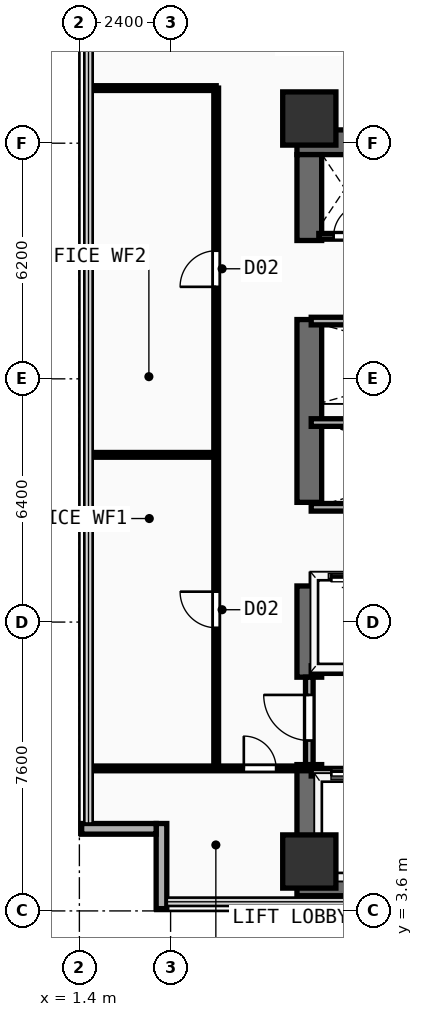
"""IFC4 building model, lengths in metres.
Left out: names, types, materials, properties, quantities, classifications, styles, units other than length and angle.
Written with IfcOpenShell. Run it as: python <this file> out.ifc"""

import sys

from ifc_helpers import new_model, si_unit, direction, frame, frame_2d, origin, origin_2d, place, context, subcontext, project, spatial, rectangle, extrude, element, fill, save


model = new_model("IFC4")
c1 = context("Model", 3, precision=1e-05, world=origin(), true_north=direction((0.0, 1.0)))
c2 = subcontext(c1, "Body", "Model", "MODEL_VIEW")
j1 = project(units=[si_unit("LENGTHUNIT", "METRE"), si_unit("PLANEANGLEUNIT", "RADIAN")], contexts=[c1])
p1 = place(None, origin())
s1 = spatial("IfcSite", under=j1, at=p1, CompositionType="ELEMENT")
p2 = place(p1, origin())
s2 = spatial("IfcBuilding", under=s1, at=p2, CompositionType="ELEMENT")
p3 = place(p2, frame((0.0, 0.0, 95.5)))
s3 = spatial("IfcBuildingStorey", under=s2, at=p3, CompositionType="ELEMENT", Elevation=95.5)
for number, where, z_axis, x_axis in (
    (1, (7.125, 4.325, 0.0), (0.0, 0.0, 1.0), (1.0, 0.0, 0.0)),
    (2, (7.125, 23.825, 0.0), (0.0, 0.0, 1.0), (1.0, 0.0, 0.0)),
):
    element("IfcWall", number, at=place(p3, frame(where, z_axis=z_axis, x_axis=x_axis)), inside=s3, PredefinedType="SHEAR", context=c2, shape_type="SweptSolid", body=[
        extrude(rectangle(XDim=14.0, YDim=0.65, at=frame_2d((7.0, 0.0))), origin(), (0.0, 0.0, 1.0), 3.54),
    ])
p4 = place(p3, frame((7.45, 4.65, 0.0), z_axis=(0.0, 0.0, 1.0), x_axis=(0.0, 1.0, 0.0)))
e3 = element("IfcWall", 3, at=p4, inside=s3, PredefinedType="SHEAR", context=c2, shape_type="SweptSolid", body=[
    extrude(rectangle(XDim=2.8, YDim=0.65, at=frame_2d((1.4, 0.0))), origin(), (0.0, 0.0, 1.0), 3.54),
])
p5 = place(p3, frame((7.45, 9.75, 0.0), z_axis=(0.0, 0.0, 1.0), x_axis=(0.0, 1.0, 0.0)))
e4 = element("IfcWall", 4, at=p5, inside=s3, PredefinedType="SHEAR", context=c2, shape_type="SweptSolid", body=[
    extrude(rectangle(XDim=2.4, YDim=0.65, at=frame_2d((1.2, 0.0))), origin(), (0.0, 0.0, 1.0), 3.54),
])
p6 = place(p3, frame((7.45, 14.35, 0.0), z_axis=(0.0, 0.0, 1.0), x_axis=(0.0, 1.0, 0.0)))
e5 = element("IfcWall", 5, at=p6, inside=s3, PredefinedType="SHEAR", context=c2, shape_type="SweptSolid", body=[
    extrude(rectangle(XDim=4.81, YDim=0.65, at=frame_2d((2.405, 0.0))), origin(), (0.0, 0.0, 1.0), 3.54),
])
p7 = place(p3, frame((7.45, 21.24, 0.0), z_axis=(0.0, 0.0, 1.0), x_axis=(0.0, 1.0, 0.0)))
e6 = element("IfcWall", 6, at=p7, inside=s3, PredefinedType="SHEAR", context=c2, shape_type="SweptSolid", body=[
    extrude(rectangle(XDim=2.26, YDim=0.65, at=frame_2d((1.13, 0.0))), origin(), (0.0, 0.0, 1.0), 3.54),
])
for number, where, z_axis, x_axis in (
    (7, (7.45, 4.9, 0.0), (0.0, 0.0, 1.0), (1.0, 0.0, 0.0)),
    (8, (7.45, 24.45, 0.0), (0.0, 0.0, 1.0), (1.0, 0.0, 0.0)),
):
    element("IfcColumn", number, at=place(p3, frame(where, z_axis=z_axis, x_axis=x_axis)), inside=s3, PredefinedType="COLUMN", context=c2, shape_type="SweptSolid", body=[
        extrude(rectangle(XDim=1.4, YDim=1.4, at=origin_2d()), origin(), (0.0, 0.0, 1.0), 3.54),
    ])
p8 = place(p3, frame((3.56, 3.66, 0.0), z_axis=(0.0, 0.0, 1.0), x_axis=(0.0, 1.0, 0.0)))
e9 = element("IfcWall", 9, at=p8, inside=s3, PredefinedType="SOLIDWALL", context=c2, shape_type="SweptSolid", body=[
    extrude(rectangle(XDim=2.24, YDim=0.28, at=frame_2d((1.12, 0.0))), origin(), (0.0, 0.0, 1.0), 3.54),
])
p9 = place(p3, frame((1.46, 5.76, 0.0), z_axis=(0.0, 0.0, 1.0), x_axis=(1.0, 0.0, 0.0)))
e10 = element("IfcWall", 10, at=p9, inside=s3, PredefinedType="SOLIDWALL", context=c2, shape_type="SweptSolid", body=[
    extrude(rectangle(XDim=1.96, YDim=0.28, at=frame_2d((0.98, 0.0))), origin(), (0.0, 0.0, 1.0), 3.54),
])
p10 = place(p3, frame((7.5, 7.25, 0.0), z_axis=(0.0, 0.0, 1.0), x_axis=(1.0, 0.0, 0.0)))
e11 = element("IfcWall", 11, at=p10, inside=s3, PredefinedType="PARTITIONING", context=c2, shape_type="SweptSolid", body=[
    extrude(rectangle(XDim=8.35, YDim=0.2, at=frame_2d((4.175, 0.0))), origin(), (0.0, 0.0, 1.0), 3.54),
])
p11 = place(p10, frame((0.53, 0.0, 0.0)))
e12 = element("IfcOpeningElement", 12, at=p11, cuts=e11, PredefinedType="OPENING", context=c2, shape_type="SweptSolid", body=[
    extrude(rectangle(XDim=1.1, YDim=2.2, at=frame_2d((0.55, 1.1))), frame((0.0, 0.11, 0.0), z_axis=(0.0, -1.0, 0.0), x_axis=(1.0, 0.0, 0.0)), (0.0, 0.0, 1.0), 0.22),
])
p12 = place(p10, frame((2.37, 0.0, 0.0)))
e13 = element("IfcOpeningElement", 13, at=p12, cuts=e11, PredefinedType="OPENING", context=c2, shape_type="SweptSolid", body=[
    extrude(rectangle(XDim=1.1, YDim=2.2, at=frame_2d((0.55, 1.1))), frame((0.0, 0.11, 0.0), z_axis=(0.0, -1.0, 0.0), x_axis=(1.0, 0.0, 0.0)), (0.0, 0.0, 1.0), 0.22),
])
p13 = place(p10, frame((4.33, 0.0, 0.0)))
e14 = element("IfcOpeningElement", 14, at=p13, cuts=e11, PredefinedType="OPENING", context=c2, shape_type="SweptSolid", body=[
    extrude(rectangle(XDim=1.1, YDim=2.2, at=frame_2d((0.55, 1.1))), frame((0.0, 0.11, 0.0), z_axis=(0.0, -1.0, 0.0), x_axis=(1.0, 0.0, 0.0)), (0.0, 0.0, 1.0), 0.22),
])
p14 = place(p10, frame((6.5, 0.0, 0.0)))
e15 = element("IfcOpeningElement", 15, at=p14, cuts=e11, PredefinedType="OPENING", context=c2, shape_type="SweptSolid", body=[
    extrude(rectangle(XDim=1.1, YDim=2.2, at=frame_2d((0.55, 1.1))), frame((0.0, 0.11, 0.0), z_axis=(0.0, -1.0, 0.0), x_axis=(1.0, 0.0, 0.0)), (0.0, 0.0, 1.0), 0.22),
])
p15 = place(p3, frame((7.5, 9.95, 0.0), z_axis=(0.0, 0.0, 1.0), x_axis=(1.0, 0.0, 0.0)))
e16 = element("IfcWall", 16, at=p15, inside=s3, PredefinedType="PARTITIONING", context=c2, shape_type="SweptSolid", body=[
    extrude(rectangle(XDim=8.35, YDim=0.2, at=frame_2d((4.175, 0.0))), origin(), (0.0, 0.0, 1.0), 3.54),
])
p16 = place(p3, frame((7.45, 7.45, 0.0), z_axis=(0.0, 0.0, 1.0), x_axis=(0.0, 1.0, 0.0)))
e17 = element("IfcWall", 17, at=p16, inside=s3, PredefinedType="PARTITIONING", context=c2, shape_type="SweptSolid", body=[
    extrude(rectangle(XDim=2.3, YDim=0.2, at=frame_2d((1.15, 0.0))), origin(), (0.0, 0.0, 1.0), 2.52),
])
p17 = place(p16, frame((0.633, 0.0, 0.0)))
e18 = element("IfcOpeningElement", 18, at=p17, cuts=e17, PredefinedType="OPENING", context=c2, shape_type="SweptSolid", body=[
    extrude(rectangle(XDim=1.2, YDim=2.25, at=frame_2d((0.6, 1.125))), frame((0.0, 0.11, 0.0), z_axis=(0.0, -1.0, 0.0), x_axis=(1.0, 0.0, 0.0)), (0.0, 0.0, 1.0), 0.22),
])
p18 = place(p3, frame((7.5, 12.36, 0.0), z_axis=(0.0, 0.0, 1.0), x_axis=(1.0, 0.0, 0.0)))
e19 = element("IfcWall", 19, at=p18, inside=s3, PredefinedType="PARTITIONING", context=c2, shape_type="SweptSolid", body=[
    extrude(rectangle(XDim=7.85, YDim=0.2, at=frame_2d((3.925, 0.0))), origin(), (0.0, 0.0, 1.0), 3.54),
])
p19 = place(p18, frame((0.53, 0.0, 0.0)))
e20 = element("IfcOpeningElement", 20, at=p19, cuts=e19, PredefinedType="OPENING", context=c2, shape_type="SweptSolid", body=[
    extrude(rectangle(XDim=1.1, YDim=2.2, at=frame_2d((0.55, 1.1))), frame((0.0, 0.11, 0.0), z_axis=(0.0, -1.0, 0.0), x_axis=(1.0, 0.0, 0.0)), (0.0, 0.0, 1.0), 0.22),
])
p20 = place(p18, frame((2.42, 0.0, 0.0)))
e21 = element("IfcOpeningElement", 21, at=p20, cuts=e19, PredefinedType="OPENING", context=c2, shape_type="SweptSolid", body=[
    extrude(rectangle(XDim=1.1, YDim=2.2, at=frame_2d((0.55, 1.1))), frame((0.0, 0.11, 0.0), z_axis=(0.0, -1.0, 0.0), x_axis=(1.0, 0.0, 0.0)), (0.0, 0.0, 1.0), 0.22),
])
p21 = place(p18, frame((4.31, 0.0, 0.0)))
e22 = element("IfcOpeningElement", 22, at=p21, cuts=e19, PredefinedType="OPENING", context=c2, shape_type="SweptSolid", body=[
    extrude(rectangle(XDim=1.1, YDim=2.2, at=frame_2d((0.55, 1.1))), frame((0.0, 0.11, 0.0), z_axis=(0.0, -1.0, 0.0), x_axis=(1.0, 0.0, 0.0)), (0.0, 0.0, 1.0), 0.22),
])
p22 = place(p18, frame((6.2, 0.0, 0.0)))
e23 = element("IfcOpeningElement", 23, at=p22, cuts=e19, PredefinedType="OPENING", context=c2, shape_type="SweptSolid", body=[
    extrude(rectangle(XDim=1.1, YDim=2.2, at=frame_2d((0.55, 1.1))), frame((0.0, 0.11, 0.0), z_axis=(0.0, -1.0, 0.0), x_axis=(1.0, 0.0, 0.0)), (0.0, 0.0, 1.0), 0.22),
])
for number, where, z_axis, x_axis in (
    (24, (7.5, 14.22, 0.0), (0.0, 0.0, 1.0), (1.0, 0.0, 0.0)),
    (25, (7.5, 16.45, 0.0), (0.0, 0.0, 1.0), (1.0, 0.0, 0.0)),
    (26, (7.5, 19.12, 0.0), (0.0, 0.0, 1.0), (1.0, 0.0, 0.0)),
):
    element("IfcWall", number, at=place(p3, frame(where, z_axis=z_axis, x_axis=x_axis)), inside=s3, PredefinedType="PARTITIONING", context=c2, shape_type="SweptSolid", body=[
        extrude(rectangle(XDim=7.85, YDim=0.2, at=frame_2d((3.925, 0.0))), origin(), (0.0, 0.0, 1.0), 3.54),
    ])
p23 = place(p3, frame((7.7, 21.35, 0.0), z_axis=(0.0, 0.0, 1.0), x_axis=(1.0, 0.0, 0.0)))
e27 = element("IfcWall", 27, at=p23, inside=s3, PredefinedType="PARTITIONING", context=c2, shape_type="SweptSolid", body=[
    extrude(rectangle(XDim=1.55, YDim=0.15, at=frame_2d((0.775, 0.0))), origin(), (0.0, 0.0, 1.0), 3.54),
])
p24 = place(p23, frame((0.39, 0.0, 0.0)))
e28 = element("IfcOpeningElement", 28, at=p24, cuts=e27, PredefinedType="OPENING", context=c2, shape_type="SweptSolid", body=[
    extrude(rectangle(XDim=0.85, YDim=2.15, at=frame_2d((0.425, 1.075))), frame((0.0, 0.085, 0.0), z_axis=(0.0, -1.0, 0.0), x_axis=(1.0, 0.0, 0.0)), (0.0, 0.0, 1.0), 0.17),
])
p25 = place(p3, frame((1.64, 7.35, 0.0), z_axis=(0.0, 0.0, 1.0), x_axis=(1.0, 0.0, 0.0)))
e29 = element("IfcWall", 29, at=p25, inside=s3, PredefinedType="PARTITIONING", context=c2, shape_type="SweptSolid", body=[
    extrude(rectangle(XDim=5.76, YDim=0.125, at=frame_2d((2.88, 0.0))), origin(), (0.0, 0.0, 1.0), 3.54),
])
p26 = place(p25, frame((4.087, 0.0, 0.0)))
e30 = element("IfcOpeningElement", 30, at=p26, cuts=e29, PredefinedType="OPENING", context=c2, shape_type="SweptSolid", body=[
    extrude(rectangle(XDim=0.85, YDim=2.15, at=frame_2d((0.425, 1.075))), frame((0.0, 0.073, 0.0), z_axis=(0.0, -1.0, 0.0), x_axis=(1.0, 0.0, 0.0)), (0.0, 0.0, 1.0), 0.145),
])
p27 = place(p3, frame((5.0, 7.5, 0.0), z_axis=(0.0, 0.0, 1.0), x_axis=(0.0, 1.0, 0.0)))
e31 = element("IfcWall", 31, at=p27, inside=s3, PredefinedType="PARTITIONING", context=c2, shape_type="SweptSolid", body=[
    extrude(rectangle(XDim=17.75, YDim=0.125, at=frame_2d((8.875, 0.0))), origin(), (0.0, 0.0, 1.0), 3.54),
])
p28 = place(p27, frame((3.55, 0.0, 0.0)))
e32 = element("IfcOpeningElement", 32, at=p28, cuts=e31, PredefinedType="OPENING", context=c2, shape_type="SweptSolid", body=[
    extrude(rectangle(XDim=0.95, YDim=2.15, at=frame_2d((0.475, 1.075))), frame((0.0, 0.073, 0.0), z_axis=(0.0, -1.0, 0.0), x_axis=(1.0, 0.0, 0.0)), (0.0, 0.0, 1.0), 0.145),
])
p29 = place(p27, frame((12.521, 0.0, 0.0)))
e33 = element("IfcOpeningElement", 33, at=p29, cuts=e31, PredefinedType="OPENING", context=c2, shape_type="SweptSolid", body=[
    extrude(rectangle(XDim=0.95, YDim=2.15, at=frame_2d((0.475, 1.075))), frame((0.0, 0.073, 0.0), z_axis=(0.0, -1.0, 0.0), x_axis=(1.0, 0.0, 0.0)), (0.0, 0.0, 1.0), 0.145),
])
for number, where, z_axis, x_axis in (
    (34, (1.64, 25.25, 0.0), (0.0, 0.0, 1.0), (1.0, 0.0, 0.0)),
    (35, (1.64, 15.6, 0.0), (0.0, 0.0, 1.0), (1.0, 0.0, 0.0)),
):
    element("IfcWall", number, at=place(p3, frame(where, z_axis=z_axis, x_axis=x_axis)), inside=s3, PredefinedType="PARTITIONING", context=c2, shape_type="SweptSolid", body=[
        extrude(rectangle(XDim=3.36, YDim=0.125, at=frame_2d((1.68, 0.0))), origin(), (0.0, 0.0, 1.0), 3.54),
    ])
p30 = place(p11, origin())
e36 = element("IfcDoor", 36, at=p30, inside=s3, OperationType="SLIDING_TO_LEFT", PredefinedType="DOOR", context=c2, shape_type="SweptSolid", body=[
    extrude(rectangle(XDim=1.1, YDim=2.2, at=frame_2d((0.55, 1.1))), frame((0.0, 0.025, 0.0), z_axis=(0.0, -1.0, 0.0), x_axis=(1.0, 0.0, 0.0)), (0.0, 0.0, 1.0), 0.05),
])
fill(e12, e36)
p31 = place(p17, frame((1.2, 0.0, 0.0), z_axis=(0.0, 0.0, 1.0), x_axis=(-1.0, 0.0, 0.0)))
e37 = element("IfcDoor", 37, at=p31, inside=s3, OperationType="SINGLE_SWING_LEFT", PredefinedType="DOOR", context=c2, shape_type="SweptSolid", body=[
    extrude(rectangle(XDim=1.2, YDim=2.25, at=frame_2d((0.6, 1.125))), frame((0.0, 0.025, 0.0), z_axis=(0.0, -1.0, 0.0), x_axis=(1.0, 0.0, 0.0)), (0.0, 0.0, 1.0), 0.05),
])
fill(e18, e37)
p32 = place(p19, origin())
e38 = element("IfcDoor", 38, at=p32, inside=s3, OperationType="SLIDING_TO_LEFT", PredefinedType="DOOR", context=c2, shape_type="SweptSolid", body=[
    extrude(rectangle(XDim=1.1, YDim=2.2, at=frame_2d((0.55, 1.1))), frame((0.0, 0.025, 0.0), z_axis=(0.0, -1.0, 0.0), x_axis=(1.0, 0.0, 0.0)), (0.0, 0.0, 1.0), 0.05),
])
fill(e20, e38)
p33 = place(p24, origin())
e39 = element("IfcDoor", 39, at=p33, inside=s3, OperationType="SINGLE_SWING_RIGHT", PredefinedType="DOOR", context=c2, shape_type="SweptSolid", body=[
    extrude(rectangle(XDim=0.85, YDim=2.15, at=frame_2d((0.425, 1.075))), frame((0.0, 0.025, 0.0), z_axis=(0.0, -1.0, 0.0), x_axis=(1.0, 0.0, 0.0)), (0.0, 0.0, 1.0), 0.05),
])
fill(e28, e39)
p34 = place(p26, origin())
e40 = element("IfcDoor", 40, at=p34, inside=s3, OperationType="SINGLE_SWING_LEFT", PredefinedType="DOOR", context=c2, shape_type="SweptSolid", body=[
    extrude(rectangle(XDim=0.85, YDim=2.15, at=frame_2d((0.425, 1.075))), frame((0.0, 0.025, 0.0), z_axis=(0.0, -1.0, 0.0), x_axis=(1.0, 0.0, 0.0)), (0.0, 0.0, 1.0), 0.05),
])
fill(e30, e40)
p35 = place(p28, origin())
e41 = element("IfcDoor", 41, at=p35, inside=s3, OperationType="SINGLE_SWING_RIGHT", PredefinedType="DOOR", context=c2, shape_type="SweptSolid", body=[
    extrude(rectangle(XDim=0.95, YDim=2.15, at=frame_2d((0.475, 1.075))), frame((0.0, 0.025, 0.0), z_axis=(0.0, -1.0, 0.0), x_axis=(1.0, 0.0, 0.0)), (0.0, 0.0, 1.0), 0.05),
])
fill(e32, e41)
p36 = place(p29, origin())
e42 = element("IfcDoor", 42, at=p36, inside=s3, OperationType="SINGLE_SWING_LEFT", PredefinedType="DOOR", context=c2, shape_type="SweptSolid", body=[
    extrude(rectangle(XDim=0.95, YDim=2.15, at=frame_2d((0.475, 1.075))), frame((0.0, 0.025, 0.0), z_axis=(0.0, -1.0, 0.0), x_axis=(1.0, 0.0, 0.0)), (0.0, 0.0, 1.0), 0.05),
])
fill(e33, e42)
save(model, sys.argv[1])
